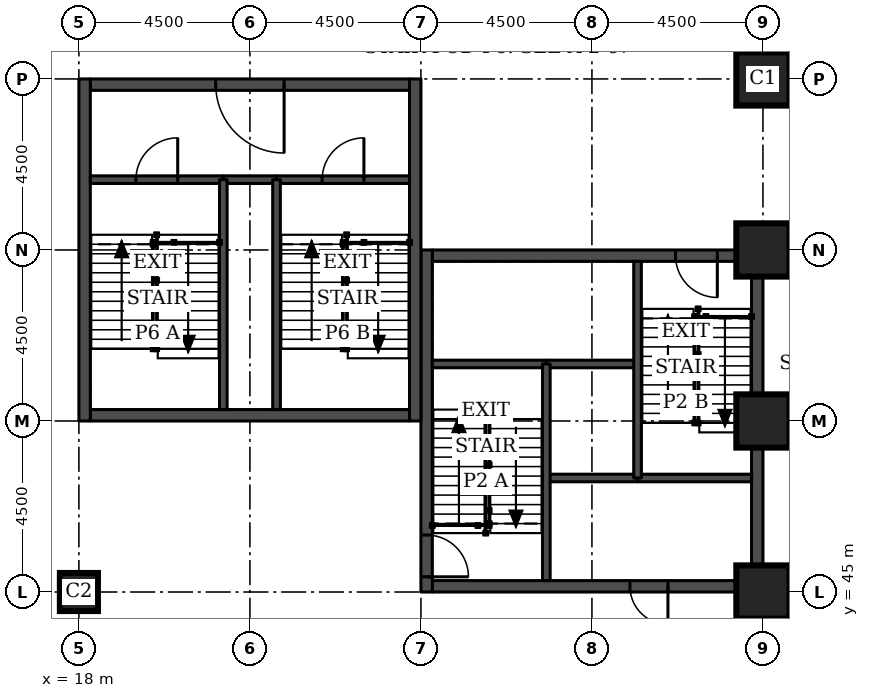
"""IFC4 building model, lengths in metres.
Left out: names, types, materials, properties, quantities, classifications, styles, units other than length and angle.
Written with IfcOpenShell. Run it as: python <this file> out.ifc"""

import sys

from ifc_helpers import new_model, si_unit, direction, frame, frame_2d, origin, origin_2d, place, context, subcontext, project, spatial, rectangle, extrude, element, fill, save


model = new_model("IFC4")
c1 = context("Model", 3, precision=1e-05, world=origin(), true_north=direction((0.0, 1.0)))
c2 = subcontext(c1, "Body", "Model", "MODEL_VIEW")
j1 = project(units=[si_unit("LENGTHUNIT", "METRE"), si_unit("PLANEANGLEUNIT", "RADIAN")], contexts=[c1])
p1 = place(None, origin())
s1 = spatial("IfcSite", under=j1, at=p1, CompositionType="ELEMENT")
p2 = place(p1, origin())
s2 = spatial("IfcBuilding", under=s1, at=p2, CompositionType="ELEMENT")
p3 = place(p2, frame((0.0, 0.0, -4.5)))
s3 = spatial("IfcBuildingStorey", under=s2, at=p3, CompositionType="ELEMENT", Elevation=-4.5)
for number, where, z_axis, x_axis in (
    (1, (36.0, 45.0, 0.0), (0.0, 0.0, 1.0), (1.0, 0.0, 0.0)),
    (2, (36.0, 49.5, 0.0), (0.0, 0.0, 1.0), (1.0, 0.0, 0.0)),
    (3, (36.0, 54.0, 0.0), (0.0, 0.0, 1.0), (1.0, 0.0, 0.0)),
    (4, (36.0, 58.5, 0.0), (0.0, 0.0, 1.0), (1.0, 0.0, 0.0)),
):
    element("IfcColumn", number, at=place(p3, frame(where, z_axis=z_axis, x_axis=x_axis)), inside=s3, PredefinedType="COLUMN", context=c2, shape_type="SweptSolid", body=[
        extrude(rectangle(XDim=1.4, YDim=1.4, at=origin_2d()), origin(), (0.0, 0.0, 1.0), 4.5),
    ])
p4 = place(p3, frame((18.0, 45.0, 0.0), z_axis=(0.0, 0.0, 1.0), x_axis=(1.0, 0.0, 0.0)))
e5 = element("IfcColumn", 5, at=p4, inside=s3, PredefinedType="COLUMN", context=c2, shape_type="SweptSolid", body=[
    extrude(rectangle(XDim=1.0, YDim=1.0, at=origin_2d()), origin(), (0.0, 0.0, 1.0), 4.5),
])
p5 = place(p3, frame((27.3, 45.15, 0.0), z_axis=(0.0, 0.0, 1.0), x_axis=(1.0, 0.0, 0.0)))
e6 = element("IfcWall", 6, at=p5, inside=s3, PredefinedType="SHEAR", context=c2, shape_type="SweptSolid", body=[
    extrude(rectangle(XDim=8.4, YDim=0.3, at=frame_2d((4.2, 0.0))), origin(), (0.0, 0.0, 1.0), 4.5),
])
p6 = place(p5, frame((5.2, 0.0, 0.0)))
e7 = element("IfcOpeningElement", 7, at=p6, cuts=e6, PredefinedType="OPENING", context=c2, shape_type="SweptSolid", body=[
    extrude(rectangle(XDim=1.0, YDim=2.1, at=frame_2d((0.5, 1.05))), frame((0.0, 0.16, 0.0), z_axis=(0.0, -1.0, 0.0), x_axis=(1.0, 0.0, 0.0)), (0.0, 0.0, 1.0), 0.32),
])
p7 = place(p3, frame((27.3, 53.85, 0.0), z_axis=(0.0, 0.0, 1.0), x_axis=(1.0, 0.0, 0.0)))
e8 = element("IfcWall", 8, at=p7, inside=s3, PredefinedType="SHEAR", context=c2, shape_type="SweptSolid", body=[
    extrude(rectangle(XDim=8.4, YDim=0.3, at=frame_2d((4.2, 0.0))), origin(), (0.0, 0.0, 1.0), 4.5),
])
p8 = place(p7, frame((6.4, 0.0, 0.0)))
e9 = element("IfcOpeningElement", 9, at=p8, cuts=e8, PredefinedType="OPENING", context=c2, shape_type="SweptSolid", body=[
    extrude(rectangle(XDim=1.1, YDim=2.1, at=frame_2d((0.55, 1.05))), frame((0.0, 0.16, 0.0), z_axis=(0.0, -1.0, 0.0), x_axis=(1.0, 0.0, 0.0)), (0.0, 0.0, 1.0), 0.32),
])
p9 = place(p3, frame((27.15, 45.0, 0.0), z_axis=(0.0, 0.0, 1.0), x_axis=(0.0, 1.0, 0.0)))
e10 = element("IfcWall", 10, at=p9, inside=s3, PredefinedType="SHEAR", context=c2, shape_type="SweptSolid", body=[
    extrude(rectangle(XDim=9.0, YDim=0.3, at=frame_2d((4.5, 0.0))), origin(), (0.0, 0.0, 1.0), 4.5),
])
p10 = place(p9, frame((0.4, 0.0, 0.0)))
e11 = element("IfcOpeningElement", 11, at=p10, cuts=e10, PredefinedType="OPENING", context=c2, shape_type="SweptSolid", body=[
    extrude(rectangle(XDim=1.1, YDim=2.1, at=frame_2d((0.55, 1.05))), frame((0.0, 0.16, 0.0), z_axis=(0.0, -1.0, 0.0), x_axis=(1.0, 0.0, 0.0)), (0.0, 0.0, 1.0), 0.32),
])
p11 = place(p3, frame((35.85, 45.0, 0.0), z_axis=(0.0, 0.0, 1.0), x_axis=(0.0, 1.0, 0.0)))
e12 = element("IfcWall", 12, at=p11, inside=s3, PredefinedType="SHEAR", context=c2, shape_type="SweptSolid", body=[
    extrude(rectangle(XDim=9.0, YDim=0.3, at=frame_2d((4.5, 0.0))), origin(), (0.0, 0.0, 1.0), 4.5),
])
p12 = place(p3, frame((18.3, 49.65, 0.0), z_axis=(0.0, 0.0, 1.0), x_axis=(1.0, 0.0, 0.0)))
e13 = element("IfcWall", 13, at=p12, inside=s3, PredefinedType="SHEAR", context=c2, shape_type="SweptSolid", body=[
    extrude(rectangle(XDim=8.4, YDim=0.3, at=frame_2d((4.2, 0.0))), origin(), (0.0, 0.0, 1.0), 4.5),
])
p13 = place(p3, frame((18.3, 58.35, 0.0), z_axis=(0.0, 0.0, 1.0), x_axis=(1.0, 0.0, 0.0)))
e14 = element("IfcWall", 14, at=p13, inside=s3, PredefinedType="SHEAR", context=c2, shape_type="SweptSolid", body=[
    extrude(rectangle(XDim=8.4, YDim=0.3, at=frame_2d((4.2, 0.0))), origin(), (0.0, 0.0, 1.0), 4.5),
])
p14 = place(p13, frame((3.3, 0.0, 0.0)))
e15 = element("IfcOpeningElement", 15, at=p14, cuts=e14, PredefinedType="OPENING", context=c2, shape_type="SweptSolid", body=[
    extrude(rectangle(XDim=1.8, YDim=2.1, at=frame_2d((0.9, 1.05))), frame((0.0, 0.16, 0.0), z_axis=(0.0, -1.0, 0.0), x_axis=(1.0, 0.0, 0.0)), (0.0, 0.0, 1.0), 0.32),
])
for number, where, z_axis, x_axis in (
    (16, (18.15, 49.5, 0.0), (0.0, 0.0, 1.0), (0.0, 1.0, 0.0)),
    (17, (26.85, 49.5, 0.0), (0.0, 0.0, 1.0), (0.0, 1.0, 0.0)),
):
    element("IfcWall", number, at=place(p3, frame(where, z_axis=z_axis, x_axis=x_axis)), inside=s3, PredefinedType="SHEAR", context=c2, shape_type="SweptSolid", body=[
        extrude(rectangle(XDim=9.0, YDim=0.3, at=frame_2d((4.5, 0.0))), origin(), (0.0, 0.0, 1.0), 4.5),
    ])
p15 = place(p3, frame((30.3, 48.0, 0.0), z_axis=(0.0, 0.0, 1.0), x_axis=(1.0, 0.0, 0.0)))
e18 = element("IfcWall", 18, at=p15, inside=s3, PredefinedType="SOLIDWALL", context=c2, shape_type="SweptSolid", body=[
    extrude(rectangle(XDim=2.4, YDim=0.2, at=frame_2d((1.2, 0.0))), origin(), (0.0, 0.0, 1.0), 4.1),
])
p16 = place(p3, frame((32.7, 48.0, 0.0), z_axis=(0.0, 0.0, 1.0), x_axis=(1.0, 0.0, 0.0)))
e19 = element("IfcWall", 19, at=p16, inside=s3, PredefinedType="SOLIDWALL", context=c2, shape_type="SweptSolid", body=[
    extrude(rectangle(XDim=3.0, YDim=0.2, at=frame_2d((1.5, 0.0))), origin(), (0.0, 0.0, 1.0), 4.1),
])
p17 = place(p3, frame((30.3, 51.0, 0.0), z_axis=(0.0, 0.0, 1.0), x_axis=(1.0, 0.0, 0.0)))
e20 = element("IfcWall", 20, at=p17, inside=s3, PredefinedType="SOLIDWALL", context=c2, shape_type="SweptSolid", body=[
    extrude(rectangle(XDim=2.4, YDim=0.2, at=frame_2d((1.2, 0.0))), origin(), (0.0, 0.0, 1.0), 4.5),
])
p18 = place(p3, frame((27.3, 51.0, 0.0), z_axis=(0.0, 0.0, 1.0), x_axis=(1.0, 0.0, 0.0)))
e21 = element("IfcWall", 21, at=p18, inside=s3, PredefinedType="SOLIDWALL", context=c2, shape_type="SweptSolid", body=[
    extrude(rectangle(XDim=3.0, YDim=0.2, at=frame_2d((1.5, 0.0))), origin(), (0.0, 0.0, 1.0), 4.1),
])
for number, where, z_axis, x_axis in (
    (22, (30.3, 45.3, 0.0), (0.0, 0.0, 1.0), (0.0, 1.0, 0.0)),
    (23, (32.7, 48.0, 0.0), (0.0, 0.0, 1.0), (0.0, 1.0, 0.0)),
):
    element("IfcWall", number, at=place(p3, frame(where, z_axis=z_axis, x_axis=x_axis)), inside=s3, PredefinedType="SOLIDWALL", context=c2, shape_type="SweptSolid", body=[
        extrude(rectangle(XDim=5.7, YDim=0.2, at=frame_2d((2.85, 0.0))), origin(), (0.0, 0.0, 1.0), 4.1),
    ])
p19 = place(p3, frame((21.8, 55.85, 0.0), z_axis=(0.0, 0.0, 1.0), x_axis=(1.0, 0.0, 0.0)))
e24 = element("IfcWall", 24, at=p19, inside=s3, PredefinedType="SOLIDWALL", context=c2, shape_type="SweptSolid", body=[
    extrude(rectangle(XDim=1.4, YDim=0.2, at=frame_2d((0.7, 0.0))), origin(), (0.0, 0.0, 1.0), 4.1),
])
p20 = place(p3, frame((18.3, 55.85, 0.0), z_axis=(0.0, 0.0, 1.0), x_axis=(1.0, 0.0, 0.0)))
e25 = element("IfcWall", 25, at=p20, inside=s3, PredefinedType="SOLIDWALL", context=c2, shape_type="SweptSolid", body=[
    extrude(rectangle(XDim=3.5, YDim=0.2, at=frame_2d((1.75, 0.0))), origin(), (0.0, 0.0, 1.0), 4.1),
])
p21 = place(p20, frame((1.2, 0.0, 0.0)))
e26 = element("IfcOpeningElement", 26, at=p21, cuts=e25, PredefinedType="OPENING", context=c2, shape_type="SweptSolid", body=[
    extrude(rectangle(XDim=1.1, YDim=2.1, at=frame_2d((0.55, 1.05))), frame((0.0, 0.11, 0.0), z_axis=(0.0, -1.0, 0.0), x_axis=(1.0, 0.0, 0.0)), (0.0, 0.0, 1.0), 0.22),
])
p22 = place(p3, frame((23.2, 55.85, 0.0), z_axis=(0.0, 0.0, 1.0), x_axis=(1.0, 0.0, 0.0)))
e27 = element("IfcWall", 27, at=p22, inside=s3, PredefinedType="SOLIDWALL", context=c2, shape_type="SweptSolid", body=[
    extrude(rectangle(XDim=3.5, YDim=0.2, at=frame_2d((1.75, 0.0))), origin(), (0.0, 0.0, 1.0), 4.1),
])
p23 = place(p22, frame((1.2, 0.0, 0.0)))
e28 = element("IfcOpeningElement", 28, at=p23, cuts=e27, PredefinedType="OPENING", context=c2, shape_type="SweptSolid", body=[
    extrude(rectangle(XDim=1.1, YDim=2.1, at=frame_2d((0.55, 1.05))), frame((0.0, 0.11, 0.0), z_axis=(0.0, -1.0, 0.0), x_axis=(1.0, 0.0, 0.0)), (0.0, 0.0, 1.0), 0.22),
])
for number, where, z_axis, x_axis in (
    (29, (21.8, 49.8, 0.0), (0.0, 0.0, 1.0), (0.0, 1.0, 0.0)),
    (30, (23.2, 49.8, 0.0), (0.0, 0.0, 1.0), (0.0, 1.0, 0.0)),
):
    element("IfcWall", number, at=place(p3, frame(where, z_axis=z_axis, x_axis=x_axis)), inside=s3, PredefinedType="SOLIDWALL", context=c2, shape_type="SweptSolid", body=[
        extrude(rectangle(XDim=6.05, YDim=0.2, at=frame_2d((3.025, 0.0))), origin(), (0.0, 0.0, 1.0), 4.1),
    ])
p24 = place(p10, frame((1.1, 0.0, 0.0), z_axis=(0.0, 0.0, 1.0), x_axis=(-1.0, 0.0, 0.0)))
e31 = element("IfcDoor", 31, at=p24, inside=s3, OperationType="SINGLE_SWING_RIGHT", PredefinedType="DOOR", context=c2, shape_type="SweptSolid", body=[
    extrude(rectangle(XDim=1.1, YDim=2.1, at=frame_2d((0.55, 1.05))), frame((0.0, 0.025, 0.0), z_axis=(0.0, -1.0, 0.0), x_axis=(1.0, 0.0, 0.0)), (0.0, 0.0, 1.0), 0.05),
])
fill(e11, e31)
p25 = place(p8, frame((1.1, 0.0, 0.0), z_axis=(0.0, 0.0, 1.0), x_axis=(-1.0, 0.0, 0.0)))
e32 = element("IfcDoor", 32, at=p25, inside=s3, OperationType="SINGLE_SWING_LEFT", PredefinedType="DOOR", context=c2, shape_type="SweptSolid", body=[
    extrude(rectangle(XDim=1.1, YDim=2.1, at=frame_2d((0.55, 1.05))), frame((0.0, 0.025, 0.0), z_axis=(0.0, -1.0, 0.0), x_axis=(1.0, 0.0, 0.0)), (0.0, 0.0, 1.0), 0.05),
])
fill(e9, e32)
p26 = place(p6, frame((1.0, 0.0, 0.0), z_axis=(0.0, 0.0, 1.0), x_axis=(-1.0, 0.0, 0.0)))
e33 = element("IfcDoor", 33, at=p26, inside=s3, OperationType="SINGLE_SWING_LEFT", PredefinedType="DOOR", context=c2, shape_type="SweptSolid", body=[
    extrude(rectangle(XDim=1.0, YDim=2.1, at=frame_2d((0.5, 1.05))), frame((0.0, 0.025, 0.0), z_axis=(0.0, -1.0, 0.0), x_axis=(1.0, 0.0, 0.0)), (0.0, 0.0, 1.0), 0.05),
])
fill(e7, e33)
p27 = place(p21, origin())
e34 = element("IfcDoor", 34, at=p27, inside=s3, OperationType="SINGLE_SWING_RIGHT", PredefinedType="DOOR", context=c2, shape_type="SweptSolid", body=[
    extrude(rectangle(XDim=1.1, YDim=2.1, at=frame_2d((0.55, 1.05))), frame((0.0, 0.025, 0.0), z_axis=(0.0, -1.0, 0.0), x_axis=(1.0, 0.0, 0.0)), (0.0, 0.0, 1.0), 0.05),
])
fill(e26, e34)
p28 = place(p23, origin())
e35 = element("IfcDoor", 35, at=p28, inside=s3, OperationType="SINGLE_SWING_RIGHT", PredefinedType="DOOR", context=c2, shape_type="SweptSolid", body=[
    extrude(rectangle(XDim=1.1, YDim=2.1, at=frame_2d((0.55, 1.05))), frame((0.0, 0.025, 0.0), z_axis=(0.0, -1.0, 0.0), x_axis=(1.0, 0.0, 0.0)), (0.0, 0.0, 1.0), 0.05),
])
fill(e28, e35)
p29 = place(p14, frame((1.8, 0.0, 0.0), z_axis=(0.0, 0.0, 1.0), x_axis=(-1.0, 0.0, 0.0)))
e36 = element("IfcDoor", 36, at=p29, inside=s3, OperationType="SINGLE_SWING_LEFT", PredefinedType="DOOR", context=c2, shape_type="SweptSolid", body=[
    extrude(rectangle(XDim=1.8, YDim=2.1, at=frame_2d((0.9, 1.05))), frame((0.0, 0.025, 0.0), z_axis=(0.0, -1.0, 0.0), x_axis=(1.0, 0.0, 0.0)), (0.0, 0.0, 1.0), 0.05),
])
fill(e15, e36)
save(model, sys.argv[1])
